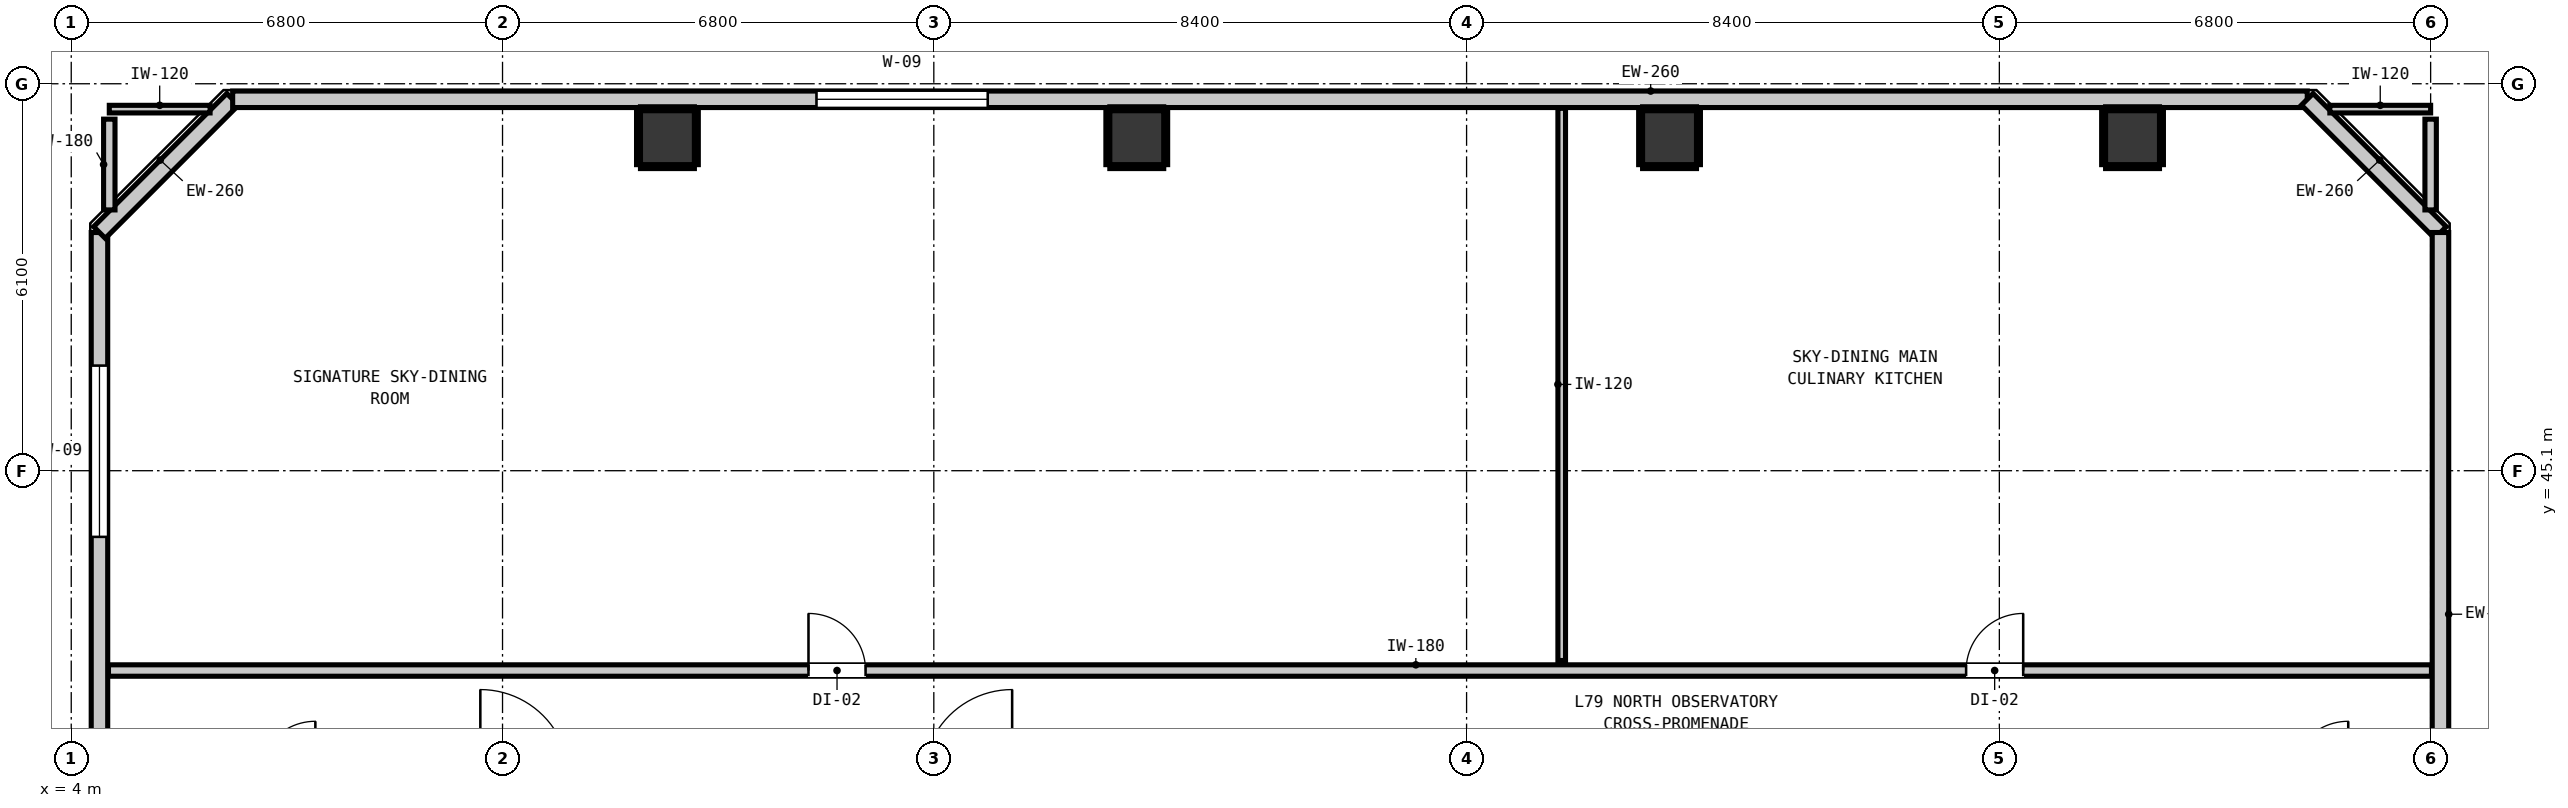
"""IFC4 building model, lengths in metres.
Left out: names, types, materials, properties, quantities, classifications, styles, units other than length and angle.
Written with IfcOpenShell. Run it as: python <this file> out.ifc"""

import sys

from ifc_helpers import new_model, si_unit, direction, frame, frame_2d, origin, origin_2d, place, context, subcontext, project, spatial, rectangle, extrude, element, fill, save


model = new_model("IFC4")
c1 = context("Model", 3, precision=1e-05, world=origin(), true_north=direction((0.0, 1.0)))
c2 = subcontext(c1, "Body", "Model", "MODEL_VIEW")
j1 = project(units=[si_unit("LENGTHUNIT", "METRE"), si_unit("PLANEANGLEUNIT", "RADIAN")], contexts=[c1])
p1 = place(None, origin())
s1 = spatial("IfcSite", under=j1, at=p1, CompositionType="ELEMENT")
p2 = place(p1, origin())
s2 = spatial("IfcBuilding", under=s1, at=p2, CompositionType="ELEMENT")
p3 = place(p2, frame((0.0, 0.0, 273.48)))
s3 = spatial("IfcBuildingStorey", under=s2, at=p3, CompositionType="ELEMENT", Elevation=273.48)
for number, where, z_axis, x_axis in (
    (1, (13.4, 50.35, 0.0), (0.0, 0.0, 1.0), (1.0, 0.0, 0.0)),
    (2, (20.8, 50.35, 0.0), (0.0, 0.0, 1.0), (1.0, 0.0, 0.0)),
    (3, (29.2, 50.35, 0.0), (0.0, 0.0, 1.0), (1.0, 0.0, 0.0)),
    (4, (36.5, 50.35, 0.0), (0.0, 0.0, 1.0), (1.0, 0.0, 0.0)),
):
    element("IfcColumn", number, at=place(p3, frame(where, z_axis=z_axis, x_axis=x_axis)), inside=s3, PredefinedType="COLUMN", context=c2, shape_type="SweptSolid", body=[
        extrude(rectangle(XDim=0.85, YDim=0.85, at=origin_2d()), origin(), (0.0, 0.0, 1.0), 4.18),
    ])
p4 = place(p3, frame((4.445, 18.545, 0.0), z_axis=(0.0, 0.0, 1.0), x_axis=(0.0, 1.0, 0.0)))
e5 = element("IfcWall", 5, at=p4, inside=s3, PredefinedType="STANDARD", context=c2, shape_type="SweptSolid", body=[
    extrude(rectangle(XDim=30.31, YDim=0.26, at=frame_2d((15.155, 0.0))), origin(), (0.0, 0.0, 1.0), 4.18),
])
p5 = place(p4, frame((25.512, 0.0, 0.85)))
e6 = element("IfcOpeningElement", 6, at=p5, cuts=e5, PredefinedType="OPENING", context=c2, shape_type="SweptSolid", body=[
    extrude(rectangle(XDim=2.7, YDim=2.0, at=frame_2d((1.35, 1.0))), frame((0.0, 0.14, 0.0), z_axis=(0.0, -1.0, 0.0), x_axis=(1.0, 0.0, 0.0)), (0.0, 0.0, 1.0), 0.28),
])
p6 = place(p3, frame((4.445, 48.855, 0.0), z_axis=(0.0, 0.0, 1.0), x_axis=(0.707065676302, 0.707147883682, 0.0)))
e7 = element("IfcWall", 7, at=p6, inside=s3, PredefinedType="STANDARD", context=c2, shape_type="SweptSolid", body=[
    extrude(rectangle(XDim=2.97, YDim=0.26, at=frame_2d((1.485, 0.0))), origin(), (0.0, 0.0, 1.0), 4.18),
])
p7 = place(p3, frame((6.545, 50.955, 0.0), z_axis=(0.0, 0.0, 1.0), x_axis=(1.0, 0.0, 0.0)))
e8 = element("IfcWall", 8, at=p7, inside=s3, PredefinedType="STANDARD", context=c2, shape_type="SweptSolid", body=[
    extrude(rectangle(XDim=32.71, YDim=0.26, at=frame_2d((16.355, 0.0))), origin(), (0.0, 0.0, 1.0), 4.18),
])
p8 = place(p7, frame((9.205, 0.0, 0.85)))
e9 = element("IfcOpeningElement", 9, at=p8, cuts=e8, PredefinedType="OPENING", context=c2, shape_type="SweptSolid", body=[
    extrude(rectangle(XDim=2.7, YDim=2.0, at=frame_2d((1.35, 1.0))), frame((0.0, 0.14, 0.0), z_axis=(0.0, -1.0, 0.0), x_axis=(1.0, 0.0, 0.0)), (0.0, 0.0, 1.0), 0.28),
])
p9 = place(p3, frame((39.255, 50.955, 0.0), z_axis=(0.0, 0.0, 1.0), x_axis=(0.707106781187, -0.707106781187, 0.0)))
e10 = element("IfcWall", 10, at=p9, inside=s3, PredefinedType="STANDARD", context=c2, shape_type="SweptSolid", body=[
    extrude(rectangle(XDim=2.97, YDim=0.26, at=frame_2d((1.485, 0.0))), origin(), (0.0, 0.0, 1.0), 4.18),
])
p10 = place(p3, frame((41.355, 48.855, 0.0), z_axis=(0.0, 0.0, 1.0), x_axis=(0.0, -1.0, 0.0)))
e11 = element("IfcWall", 11, at=p10, inside=s3, PredefinedType="STANDARD", context=c2, shape_type="SweptSolid", body=[
    extrude(rectangle(XDim=30.31, YDim=0.26, at=frame_2d((15.155, 0.0))), origin(), (0.0, 0.0, 1.0), 4.18),
])
p11 = place(p10, frame((21.155, 0.0, 0.85)))
e12 = element("IfcOpeningElement", 12, at=p11, cuts=e11, PredefinedType="OPENING", context=c2, shape_type="SweptSolid", body=[
    extrude(rectangle(XDim=2.7, YDim=2.0, at=frame_2d((1.35, 1.0))), frame((0.0, 0.14, 0.0), z_axis=(0.0, -1.0, 0.0), x_axis=(1.0, 0.0, 0.0)), (0.0, 0.0, 1.0), 0.28),
])
p12 = place(p10, frame((12.135, 0.0, 0.85)))
e13 = element("IfcOpeningElement", 13, at=p12, cuts=e11, PredefinedType="OPENING", context=c2, shape_type="SweptSolid", body=[
    extrude(rectangle(XDim=2.7, YDim=2.0, at=frame_2d((1.35, 1.0))), frame((0.0, 0.14, 0.0), z_axis=(0.0, -1.0, 0.0), x_axis=(1.0, 0.0, 0.0)), (0.0, 0.0, 1.0), 0.28),
])
p13 = place(p3, frame((4.587, 41.95, 0.0), z_axis=(0.0, 0.0, 1.0), x_axis=(1.0, 0.0, 0.0)))
e14 = element("IfcWall", 14, at=p13, inside=s3, PredefinedType="PARTITIONING", context=c2, shape_type="SweptSolid", body=[
    extrude(rectangle(XDim=36.626, YDim=0.18, at=frame_2d((18.313, 0.0))), origin(), (0.0, 0.0, 1.0), 4.18),
])
p14 = place(p13, frame((11.037, 0.0, 0.0)))
e15 = element("IfcOpeningElement", 15, at=p14, cuts=e14, PredefinedType="OPENING", context=c2, shape_type="SweptSolid", body=[
    extrude(rectangle(XDim=0.9, YDim=2.1, at=frame_2d((0.45, 1.05))), frame((0.0, 0.1, 0.0), z_axis=(0.0, -1.0, 0.0), x_axis=(1.0, 0.0, 0.0)), (0.0, 0.0, 1.0), 0.2),
])
p15 = place(p13, frame((29.289, 0.0, 0.0)))
e16 = element("IfcOpeningElement", 16, at=p15, cuts=e14, PredefinedType="OPENING", context=c2, shape_type="SweptSolid", body=[
    extrude(rectangle(XDim=0.9, YDim=2.1, at=frame_2d((0.45, 1.05))), frame((0.0, 0.1, 0.0), z_axis=(0.0, -1.0, 0.0), x_axis=(1.0, 0.0, 0.0)), (0.0, 0.0, 1.0), 0.2),
])
for number, where, z_axis, x_axis in (
    (17, (4.6, 50.8, 0.0), (0.0, 0.0, 1.0), (1.0, 0.0, 0.0)),
    (18, (39.611, 50.8, 0.0), (0.0, 0.0, 1.0), (1.0, 0.0, 0.0)),
):
    element("IfcWall", number, at=place(p3, frame(where, z_axis=z_axis, x_axis=x_axis)), inside=s3, PredefinedType="PARTITIONING", context=c2, shape_type="SweptSolid", body=[
        extrude(rectangle(XDim=1.589, YDim=0.12, at=frame_2d((0.794, 0.0))), origin(), (0.0, 0.0, 1.0), 4.18),
    ])
for number, where, z_axis, x_axis in (
    (19, (4.6, 49.211, 0.0), (0.0, 0.0, 1.0), (0.0, 1.0, 0.0)),
    (20, (41.2, 49.211, 0.0), (0.0, 0.0, 1.0), (0.0, 1.0, 0.0)),
):
    element("IfcWall", number, at=place(p3, frame(where, z_axis=z_axis, x_axis=x_axis)), inside=s3, PredefinedType="PARTITIONING", context=c2, shape_type="SweptSolid", body=[
        extrude(rectangle(XDim=1.431, YDim=0.18, at=frame_2d((0.716, 0.0))), origin(), (0.0, 0.0, 1.0), 4.18),
    ])
p16 = place(p3, frame((27.5, 42.108, 0.0), z_axis=(0.0, 0.0, 1.0), x_axis=(0.0, 1.0, 0.0)))
e21 = element("IfcWall", 21, at=p16, inside=s3, PredefinedType="PARTITIONING", context=c2, shape_type="SweptSolid", body=[
    extrude(rectangle(XDim=8.705, YDim=0.12, at=frame_2d((4.353, 0.0))), origin(), (0.0, 0.0, 1.0), 4.18),
])
for number, where, z_axis, x_axis in (
    (22, (12.975, 49.893, 0.0), (0.0, 0.0, 1.0), (1.0, 0.0, 0.0)),
    (23, (12.975, 50.807, 0.0), (0.0, 0.0, 1.0), (1.0, 0.0, 0.0)),
    (24, (12.943, 49.925, 0.0), (0.0, 0.0, 1.0), (0.0, 1.0, 0.0)),
    (25, (13.857, 49.925, 0.0), (0.0, 0.0, 1.0), (0.0, 1.0, 0.0)),
):
    element("IfcWall", number, at=place(p3, frame(where, z_axis=z_axis, x_axis=x_axis)), inside=s3, PredefinedType="PARTITIONING", context=c2, shape_type="SweptSolid", body=[
        extrude(rectangle(XDim=0.85, YDim=0.06, at=frame_2d((0.425, 0.0))), origin(), (0.0, 0.0, 1.0), 1.45),
    ])
for number, where, z_axis, x_axis in (
    (26, (20.375, 49.893, 0.0), (0.0, 0.0, 1.0), (1.0, 0.0, 0.0)),
    (27, (20.375, 50.807, 0.0), (0.0, 0.0, 1.0), (1.0, 0.0, 0.0)),
):
    element("IfcWall", number, at=place(p3, frame(where, z_axis=z_axis, x_axis=x_axis)), inside=s3, PredefinedType="PARTITIONING", context=c2, shape_type="SweptSolid", body=[
        extrude(rectangle(XDim=0.85, YDim=0.06, at=frame_2d((0.425, 0.0))), origin(), (0.0, 0.0, 1.0), 1.45),
    ])
for number, where, z_axis, x_axis in (
    (28, (20.343, 49.925, 0.0), (0.0, 0.0, 1.0), (0.0, 1.0, 0.0)),
    (29, (21.257, 49.925, 0.0), (0.0, 0.0, 1.0), (0.0, 1.0, 0.0)),
):
    element("IfcWall", number, at=place(p3, frame(where, z_axis=z_axis, x_axis=x_axis)), inside=s3, PredefinedType="PARTITIONING", context=c2, shape_type="SweptSolid", body=[
        extrude(rectangle(XDim=0.85, YDim=0.06, at=frame_2d((0.425, 0.0))), origin(), (0.0, 0.0, 1.0), 1.45),
    ])
for number, where, z_axis, x_axis in (
    (30, (28.775, 49.893, 0.0), (0.0, 0.0, 1.0), (1.0, 0.0, 0.0)),
    (31, (28.775, 50.807, 0.0), (0.0, 0.0, 1.0), (1.0, 0.0, 0.0)),
):
    element("IfcWall", number, at=place(p3, frame(where, z_axis=z_axis, x_axis=x_axis)), inside=s3, PredefinedType="PARTITIONING", context=c2, shape_type="SweptSolid", body=[
        extrude(rectangle(XDim=0.85, YDim=0.06, at=frame_2d((0.425, 0.0))), origin(), (0.0, 0.0, 1.0), 1.45),
    ])
for number, where, z_axis, x_axis in (
    (32, (28.743, 49.925, 0.0), (0.0, 0.0, 1.0), (0.0, 1.0, 0.0)),
    (33, (29.657, 49.925, 0.0), (0.0, 0.0, 1.0), (0.0, 1.0, 0.0)),
):
    element("IfcWall", number, at=place(p3, frame(where, z_axis=z_axis, x_axis=x_axis)), inside=s3, PredefinedType="PARTITIONING", context=c2, shape_type="SweptSolid", body=[
        extrude(rectangle(XDim=0.85, YDim=0.06, at=frame_2d((0.425, 0.0))), origin(), (0.0, 0.0, 1.0), 1.45),
    ])
for number, where, z_axis, x_axis in (
    (34, (36.075, 49.893, 0.0), (0.0, 0.0, 1.0), (1.0, 0.0, 0.0)),
    (35, (36.075, 50.807, 0.0), (0.0, 0.0, 1.0), (1.0, 0.0, 0.0)),
):
    element("IfcWall", number, at=place(p3, frame(where, z_axis=z_axis, x_axis=x_axis)), inside=s3, PredefinedType="PARTITIONING", context=c2, shape_type="SweptSolid", body=[
        extrude(rectangle(XDim=0.85, YDim=0.06, at=frame_2d((0.425, 0.0))), origin(), (0.0, 0.0, 1.0), 1.45),
    ])
for number, where, z_axis, x_axis in (
    (36, (36.043, 49.925, 0.0), (0.0, 0.0, 1.0), (0.0, 1.0, 0.0)),
    (37, (36.957, 49.925, 0.0), (0.0, 0.0, 1.0), (0.0, 1.0, 0.0)),
):
    element("IfcWall", number, at=place(p3, frame(where, z_axis=z_axis, x_axis=x_axis)), inside=s3, PredefinedType="PARTITIONING", context=c2, shape_type="SweptSolid", body=[
        extrude(rectangle(XDim=0.85, YDim=0.06, at=frame_2d((0.425, 0.0))), origin(), (0.0, 0.0, 1.0), 1.45),
    ])
p17 = place(p5, origin())
e38 = element("IfcWindow", 38, at=p17, inside=s3, PartitioningType="SINGLE_PANEL", PredefinedType="WINDOW", context=c2, shape_type="SweptSolid", body=[
    extrude(rectangle(XDim=2.7, YDim=2.0, at=frame_2d((1.35, 1.0))), frame((0.0, 0.03, 0.0), z_axis=(0.0, -1.0, 0.0), x_axis=(1.0, 0.0, 0.0)), (0.0, 0.0, 1.0), 0.06),
])
fill(e6, e38)
p18 = place(p8, origin())
e39 = element("IfcWindow", 39, at=p18, inside=s3, PartitioningType="SINGLE_PANEL", PredefinedType="WINDOW", context=c2, shape_type="SweptSolid", body=[
    extrude(rectangle(XDim=2.7, YDim=2.0, at=frame_2d((1.35, 1.0))), frame((0.0, 0.03, 0.0), z_axis=(0.0, -1.0, 0.0), x_axis=(1.0, 0.0, 0.0)), (0.0, 0.0, 1.0), 0.06),
])
fill(e9, e39)
p19 = place(p14, origin())
e40 = element("IfcDoor", 40, at=p19, inside=s3, OperationType="SINGLE_SWING_LEFT", PredefinedType="DOOR", context=c2, shape_type="SweptSolid", body=[
    extrude(rectangle(XDim=0.9, YDim=2.1, at=frame_2d((0.45, 1.05))), frame((0.0, 0.025, 0.0), z_axis=(0.0, -1.0, 0.0), x_axis=(1.0, 0.0, 0.0)), (0.0, 0.0, 1.0), 0.05),
])
fill(e15, e40)
p20 = place(p15, origin())
e41 = element("IfcDoor", 41, at=p20, inside=s3, OperationType="SINGLE_SWING_RIGHT", PredefinedType="DOOR", context=c2, shape_type="SweptSolid", body=[
    extrude(rectangle(XDim=0.9, YDim=2.1, at=frame_2d((0.45, 1.05))), frame((0.0, 0.025, 0.0), z_axis=(0.0, -1.0, 0.0), x_axis=(1.0, 0.0, 0.0)), (0.0, 0.0, 1.0), 0.05),
])
fill(e16, e41)
save(model, sys.argv[1])
